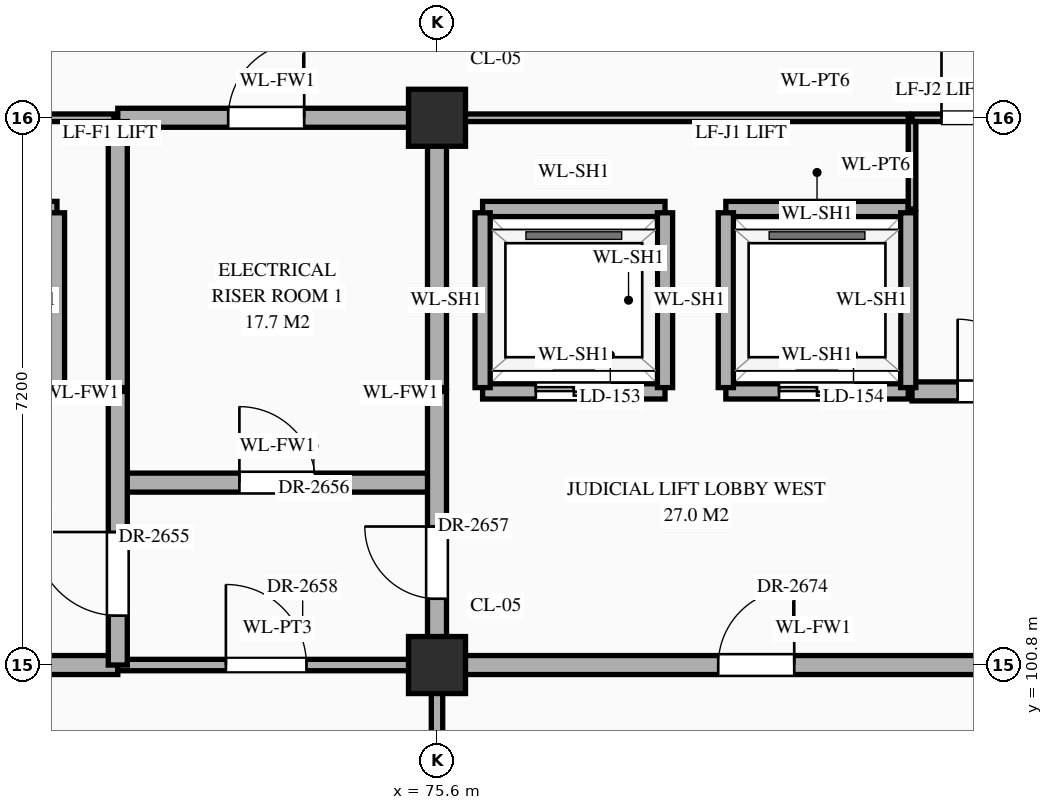
"""IFC4 building model, lengths in metres.
Left out: names, types, materials, properties, quantities, classifications, styles, units other than length and angle.
Written with IfcOpenShell. Run it as: python <this file> out.ifc"""

import sys

from ifc_helpers import new_model, si_unit, direction, frame, frame_2d, origin, origin_2d, place, context, subcontext, project, spatial, rectangle, extrude, element, fill, save


model = new_model("IFC4")
c1 = context("Model", 3, precision=1e-05, world=origin(), true_north=direction((0.0, 1.0)))
c2 = subcontext(c1, "Body", "Model", "MODEL_VIEW")
j1 = project(units=[si_unit("LENGTHUNIT", "METRE"), si_unit("PLANEANGLEUNIT", "RADIAN")], contexts=[c1])
p1 = place(None, origin())
s1 = spatial("IfcSite", under=j1, at=p1, CompositionType="ELEMENT")
p2 = place(p1, origin())
s2 = spatial("IfcBuilding", under=s1, at=p2, CompositionType="ELEMENT")
p3 = place(p2, frame((0.0, 0.0, 39.3)))
s3 = spatial("IfcBuildingStorey", under=s2, at=p3, CompositionType="ELEMENT", Elevation=39.3)
for number, where, z_axis, x_axis in (
    (1, (75.6, 100.8, 0.0), (0.0, 0.0, 1.0), (1.0, 0.0, 0.0)),
    (2, (75.6, 108.0, 0.0), (0.0, 0.0, 1.0), (1.0, 0.0, 0.0)),
):
    element("IfcColumn", number, at=place(p3, frame(where, z_axis=z_axis, x_axis=x_axis)), inside=s3, PredefinedType="COLUMN", context=c2, shape_type="SweptSolid", body=[
        extrude(rectangle(XDim=0.75, YDim=0.75, at=origin_2d()), origin(), (0.0, 0.0, 1.0), 4.2),
    ])
p4 = place(p3, frame((58.8, 100.8, 0.0), z_axis=(0.0, 0.0, 1.0), x_axis=(1.0, 0.0, 0.0)))
e3 = element("IfcWall", 3, at=p4, inside=s3, PredefinedType="STANDARD", context=c2, shape_type="SweptSolid", body=[
    extrude(rectangle(XDim=12.6, YDim=0.25, at=frame_2d((6.3, 0.0))), origin(), (0.0, 0.0, 1.0), 3.1),
])
p5 = place(p4, frame((3.7, 0.0, 0.0)))
e4 = element("IfcOpeningElement", 4, at=p5, cuts=e3, PredefinedType="OPENING", context=c2, shape_type="SweptSolid", body=[
    extrude(rectangle(XDim=1.0, YDim=2.2, at=frame_2d((0.5, 1.1))), frame((0.0, 0.137, 0.0), z_axis=(0.0, -1.0, 0.0), x_axis=(1.0, 0.0, 0.0)), (0.0, 0.0, 1.0), 0.274),
])
p6 = place(p3, frame((71.4, 100.8, 0.0), z_axis=(0.0, 0.0, 1.0), x_axis=(1.0, 0.0, 0.0)))
e5 = element("IfcWall", 5, at=p6, inside=s3, PredefinedType="STANDARD", context=c2, shape_type="SweptSolid", body=[
    extrude(rectangle(XDim=4.2, YDim=0.15, at=frame_2d((2.1, 0.0))), origin(), (0.0, 0.0, 1.0), 3.1),
])
p7 = place(p6, frame((1.423, 0.0, 0.0)))
e6 = element("IfcOpeningElement", 6, at=p7, cuts=e5, PredefinedType="OPENING", context=c2, shape_type="SweptSolid", body=[
    extrude(rectangle(XDim=1.06, YDim=2.4, at=frame_2d((0.53, 1.2))), frame((0.0, 0.087, 0.0), z_axis=(0.0, -1.0, 0.0), x_axis=(1.0, 0.0, 0.0)), (0.0, 0.0, 1.0), 0.174),
])
p8 = place(p3, frame((75.6, 100.8, 0.0), z_axis=(0.0, 0.0, 1.0), x_axis=(1.0, 0.0, 0.0)))
e7 = element("IfcWall", 7, at=p8, inside=s3, PredefinedType="STANDARD", context=c2, shape_type="SweptSolid", body=[
    extrude(rectangle(XDim=16.8, YDim=0.25, at=frame_2d((8.4, 0.0))), origin(), (0.0, 0.0, 1.0), 3.1),
])
p9 = place(p8, frame((3.7, 0.0, 0.0)))
e8 = element("IfcOpeningElement", 8, at=p9, cuts=e7, PredefinedType="OPENING", context=c2, shape_type="SweptSolid", body=[
    extrude(rectangle(XDim=1.0, YDim=2.2, at=frame_2d((0.5, 1.1))), frame((0.0, 0.137, 0.0), z_axis=(0.0, -1.0, 0.0), x_axis=(1.0, 0.0, 0.0)), (0.0, 0.0, 1.0), 0.274),
])
p10 = place(p8, frame((9.698, 0.0, 0.0)))
e9 = element("IfcOpeningElement", 9, at=p10, cuts=e7, PredefinedType="OPENING", context=c2, shape_type="SweptSolid", body=[
    extrude(rectangle(XDim=1.1, YDim=2.2, at=frame_2d((0.55, 1.1))), frame((0.0, 0.137, 0.0), z_axis=(0.0, -1.0, 0.0), x_axis=(1.0, 0.0, 0.0)), (0.0, 0.0, 1.0), 0.274),
])
p11 = place(p8, frame((12.5, 0.0, 0.0)))
e10 = element("IfcOpeningElement", 10, at=p11, cuts=e7, PredefinedType="OPENING", context=c2, shape_type="SweptSolid", body=[
    extrude(rectangle(XDim=1.0, YDim=2.2, at=frame_2d((0.5, 1.1))), frame((0.0, 0.137, 0.0), z_axis=(0.0, -1.0, 0.0), x_axis=(1.0, 0.0, 0.0)), (0.0, 0.0, 1.0), 0.274),
])
p12 = place(p8, frame((14.877, 0.0, 0.0)))
e11 = element("IfcOpeningElement", 11, at=p12, cuts=e7, PredefinedType="OPENING", context=c2, shape_type="SweptSolid", body=[
    extrude(rectangle(XDim=0.95, YDim=2.15, at=frame_2d((0.475, 1.075))), frame((0.0, 0.137, 0.0), z_axis=(0.0, -1.0, 0.0), x_axis=(1.0, 0.0, 0.0)), (0.0, 0.0, 1.0), 0.274),
])
p13 = place(p3, frame((71.4, 103.2, 0.0), z_axis=(0.0, 0.0, 1.0), x_axis=(1.0, 0.0, 0.0)))
e12 = element("IfcWall", 12, at=p13, inside=s3, PredefinedType="STANDARD", context=c2, shape_type="SweptSolid", body=[
    extrude(rectangle(XDim=4.2, YDim=0.25, at=frame_2d((2.1, 0.0))), origin(), (0.0, 0.0, 1.0), 3.95),
])
p14 = place(p13, frame((1.6, 0.0, 0.0)))
e13 = element("IfcOpeningElement", 13, at=p14, cuts=e12, PredefinedType="OPENING", context=c2, shape_type="SweptSolid", body=[
    extrude(rectangle(XDim=1.0, YDim=2.2, at=frame_2d((0.5, 1.1))), frame((0.0, 0.137, 0.0), z_axis=(0.0, -1.0, 0.0), x_axis=(1.0, 0.0, 0.0)), (0.0, 0.0, 1.0), 0.274),
])
p15 = place(p3, frame((67.6, 104.4, 0.0), z_axis=(0.0, 0.0, 1.0), x_axis=(1.0, 0.0, 0.0)))
e14 = element("IfcWall", 14, at=p15, inside=s3, PredefinedType="STANDARD", context=c2, shape_type="SweptSolid", body=[
    extrude(rectangle(XDim=3.0, YDim=0.2, at=frame_2d((1.5, 0.0))), origin(), (0.0, 0.0, 1.0), 3.95),
])
p16 = place(p15, frame((0.9, 0.0, 0.0)))
e15 = element("IfcOpeningElement", 15, at=p16, cuts=e14, PredefinedType="OPENING", context=c2, shape_type="SweptSolid", body=[
    extrude(rectangle(XDim=1.2, YDim=2.15, at=frame_2d((0.6, 1.075))), frame((0.0, 0.112, 0.0), z_axis=(0.0, -1.0, 0.0), x_axis=(1.0, 0.0, 0.0)), (0.0, 0.0, 1.0), 0.224),
])
p17 = place(p3, frame((76.2, 104.4, 0.0), z_axis=(0.0, 0.0, 1.0), x_axis=(1.0, 0.0, 0.0)))
e16 = element("IfcWall", 16, at=p17, inside=s3, PredefinedType="STANDARD", context=c2, shape_type="SweptSolid", body=[
    extrude(rectangle(XDim=2.4, YDim=0.2, at=frame_2d((1.2, 0.0))), origin(), (0.0, 0.0, 1.0), 3.95),
])
p18 = place(p17, frame((0.7, 0.0, 0.0)))
e17 = element("IfcOpeningElement", 17, at=p18, cuts=e16, PredefinedType="OPENING", context=c2, shape_type="SweptSolid", body=[
    extrude(rectangle(XDim=1.0, YDim=2.15, at=frame_2d((0.5, 1.075))), frame((0.0, 0.112, 0.0), z_axis=(0.0, -1.0, 0.0), x_axis=(1.0, 0.0, 0.0)), (0.0, 0.0, 1.0), 0.224),
])
p19 = place(p3, frame((79.4, 104.4, 0.0), z_axis=(0.0, 0.0, 1.0), x_axis=(1.0, 0.0, 0.0)))
e18 = element("IfcWall", 18, at=p19, inside=s3, PredefinedType="STANDARD", context=c2, shape_type="SweptSolid", body=[
    extrude(rectangle(XDim=2.4, YDim=0.2, at=frame_2d((1.2, 0.0))), origin(), (0.0, 0.0, 1.0), 3.95),
])
p20 = place(p19, frame((0.7, 0.0, 0.0)))
e19 = element("IfcOpeningElement", 19, at=p20, cuts=e18, PredefinedType="OPENING", context=c2, shape_type="SweptSolid", body=[
    extrude(rectangle(XDim=1.0, YDim=2.15, at=frame_2d((0.5, 1.075))), frame((0.0, 0.112, 0.0), z_axis=(0.0, -1.0, 0.0), x_axis=(1.0, 0.0, 0.0)), (0.0, 0.0, 1.0), 0.224),
])
p21 = place(p3, frame((81.85, 104.4, 0.0), z_axis=(0.0, 0.0, 1.0), x_axis=(1.0, 0.0, 0.0)))
e20 = element("IfcWall", 20, at=p21, inside=s3, PredefinedType="STANDARD", context=c2, shape_type="SweptSolid", body=[
    extrude(rectangle(XDim=4.3, YDim=0.25, at=frame_2d((2.15, 0.0))), origin(), (0.0, 0.0, 1.0), 3.95),
])
p22 = place(p21, frame((0.6, 0.0, 0.0)))
e21 = element("IfcOpeningElement", 21, at=p22, cuts=e20, PredefinedType="OPENING", context=c2, shape_type="SweptSolid", body=[
    extrude(rectangle(XDim=0.95, YDim=2.15, at=frame_2d((0.475, 1.075))), frame((0.0, 0.137, 0.0), z_axis=(0.0, -1.0, 0.0), x_axis=(1.0, 0.0, 0.0)), (0.0, 0.0, 1.0), 0.274),
])
p23 = place(p21, frame((2.675, 0.0, 0.0)))
e22 = element("IfcOpeningElement", 22, at=p23, cuts=e20, PredefinedType="OPENING", context=c2, shape_type="SweptSolid", body=[
    extrude(rectangle(XDim=1.1, YDim=2.2, at=frame_2d((0.55, 1.1))), frame((0.0, 0.137, 0.0), z_axis=(0.0, -1.0, 0.0), x_axis=(1.0, 0.0, 0.0)), (0.0, 0.0, 1.0), 0.274),
])
p24 = place(p3, frame((67.6, 106.8, 0.0), z_axis=(0.0, 0.0, 1.0), x_axis=(1.0, 0.0, 0.0)))
e23 = element("IfcWall", 23, at=p24, inside=s3, PredefinedType="STANDARD", context=c2, shape_type="SweptSolid", body=[
    extrude(rectangle(XDim=3.0, YDim=0.2, at=frame_2d((1.5, 0.0))), origin(), (0.0, 0.0, 1.0), 3.95),
])
for number, where, z_axis, x_axis in (
    (24, (76.2, 106.8, 0.0), (0.0, 0.0, 1.0), (1.0, 0.0, 0.0)),
    (25, (79.4, 106.8, 0.0), (0.0, 0.0, 1.0), (1.0, 0.0, 0.0)),
):
    element("IfcWall", number, at=place(p3, frame(where, z_axis=z_axis, x_axis=x_axis)), inside=s3, PredefinedType="STANDARD", context=c2, shape_type="SweptSolid", body=[
        extrude(rectangle(XDim=2.4, YDim=0.2, at=frame_2d((1.2, 0.0))), origin(), (0.0, 0.0, 1.0), 3.95),
    ])
p25 = place(p3, frame((67.25, 108.0, 0.0), z_axis=(0.0, 0.0, 1.0), x_axis=(1.0, 0.0, 0.0)))
e26 = element("IfcWall", 26, at=p25, inside=s3, PredefinedType="STANDARD", context=c2, shape_type="SweptSolid", body=[
    extrude(rectangle(XDim=4.1, YDim=0.1, at=frame_2d((2.05, 0.0))), origin(), (0.0, 0.0, 1.0), 3.1),
])
p26 = place(p3, frame((71.4, 108.0, 0.0), z_axis=(0.0, 0.0, 1.0), x_axis=(1.0, 0.0, 0.0)))
e27 = element("IfcWall", 27, at=p26, inside=s3, PredefinedType="STANDARD", context=c2, shape_type="SweptSolid", body=[
    extrude(rectangle(XDim=4.2, YDim=0.25, at=frame_2d((2.1, 0.0))), origin(), (0.0, 0.0, 1.0), 3.1),
])
p27 = place(p26, frame((1.452, 0.0, 0.0)))
e28 = element("IfcOpeningElement", 28, at=p27, cuts=e27, PredefinedType="OPENING", context=c2, shape_type="SweptSolid", body=[
    extrude(rectangle(XDim=1.0, YDim=2.2, at=frame_2d((0.5, 1.1))), frame((0.0, 0.137, 0.0), z_axis=(0.0, -1.0, 0.0), x_axis=(1.0, 0.0, 0.0)), (0.0, 0.0, 1.0), 0.274),
])
p28 = place(p3, frame((75.65, 108.0, 0.0), z_axis=(0.0, 0.0, 1.0), x_axis=(1.0, 0.0, 0.0)))
e29 = element("IfcWall", 29, at=p28, inside=s3, PredefinedType="STANDARD", context=c2, shape_type="SweptSolid", body=[
    extrude(rectangle(XDim=6.15, YDim=0.1, at=frame_2d((3.075, 0.0))), origin(), (0.0, 0.0, 1.0), 3.1),
])
p29 = place(p3, frame((81.85, 108.0, 0.0), z_axis=(0.0, 0.0, 1.0), x_axis=(1.0, 0.0, 0.0)))
e30 = element("IfcWall", 30, at=p29, inside=s3, PredefinedType="STANDARD", context=c2, shape_type="SweptSolid", body=[
    extrude(rectangle(XDim=4.3, YDim=0.1, at=frame_2d((2.15, 0.0))), origin(), (0.0, 0.0, 1.0), 3.1),
])
p30 = place(p29, frame((0.387, 0.0, 0.0)))
e31 = element("IfcOpeningElement", 31, at=p30, cuts=e30, PredefinedType="OPENING", context=c2, shape_type="SweptSolid", body=[
    extrude(rectangle(XDim=1.08, YDim=2.25, at=frame_2d((0.54, 1.125))), frame((0.0, 0.062, 0.0), z_axis=(0.0, -1.0, 0.0), x_axis=(1.0, 0.0, 0.0)), (0.0, 0.0, 1.0), 0.124),
])
p31 = place(p29, frame((2.812, 0.0, 0.0)))
e32 = element("IfcOpeningElement", 32, at=p31, cuts=e30, PredefinedType="OPENING", context=c2, shape_type="SweptSolid", body=[
    extrude(rectangle(XDim=1.12, YDim=2.25, at=frame_2d((0.56, 1.125))), frame((0.0, 0.062, 0.0), z_axis=(0.0, -1.0, 0.0), x_axis=(1.0, 0.0, 0.0)), (0.0, 0.0, 1.0), 0.124),
])
p32 = place(p3, frame((70.6, 104.45, 0.0), z_axis=(0.0, 0.0, 1.0), x_axis=(0.0, 1.0, 0.0)))
e33 = element("IfcWall", 33, at=p32, inside=s3, PredefinedType="STANDARD", context=c2, shape_type="SweptSolid", body=[
    extrude(rectangle(XDim=2.3, YDim=0.2, at=frame_2d((1.15, 0.0))), origin(), (0.0, 0.0, 1.0), 3.95),
])
p33 = place(p3, frame((71.4, 100.8, 0.0), z_axis=(0.0, 0.0, 1.0), x_axis=(0.0, 1.0, 0.0)))
e34 = element("IfcWall", 34, at=p33, inside=s3, PredefinedType="STANDARD", context=c2, shape_type="SweptSolid", body=[
    extrude(rectangle(XDim=3.6, YDim=0.25, at=frame_2d((1.8, 0.0))), origin(), (0.0, 0.0, 1.0), 3.6),
])
p34 = place(p33, frame((0.65, 0.0, 0.0)))
e35 = element("IfcOpeningElement", 35, at=p34, cuts=e34, PredefinedType="OPENING", context=c2, shape_type="SweptSolid", body=[
    extrude(rectangle(XDim=1.1, YDim=2.2, at=frame_2d((0.55, 1.1))), frame((0.0, 0.137, 0.0), z_axis=(0.0, -1.0, 0.0), x_axis=(1.0, 0.0, 0.0)), (0.0, 0.0, 1.0), 0.274),
])
p35 = place(p3, frame((71.4, 104.45, 0.0), z_axis=(0.0, 0.0, 1.0), x_axis=(0.0, 1.0, 0.0)))
e36 = element("IfcWall", 36, at=p35, inside=s3, PredefinedType="STANDARD", context=c2, shape_type="SweptSolid", body=[
    extrude(rectangle(XDim=3.5, YDim=0.25, at=frame_2d((1.75, 0.0))), origin(), (0.0, 0.0, 1.0), 3.6),
])
p36 = place(p3, frame((75.6, 96.0, 0.0), z_axis=(0.0, 0.0, 1.0), x_axis=(0.0, 1.0, 0.0)))
e37 = element("IfcWall", 37, at=p36, inside=s3, PredefinedType="STANDARD", context=c2, shape_type="SweptSolid", body=[
    extrude(rectangle(XDim=4.8, YDim=0.15, at=frame_2d((2.4, 0.0))), origin(), (0.0, 0.0, 1.0), 3.2),
])
p37 = place(p3, frame((75.6, 100.8, 0.0), z_axis=(0.0, 0.0, 1.0), x_axis=(0.0, 1.0, 0.0)))
e38 = element("IfcWall", 38, at=p37, inside=s3, PredefinedType="STANDARD", context=c2, shape_type="SweptSolid", body=[
    extrude(rectangle(XDim=3.6, YDim=0.25, at=frame_2d((1.8, 0.0))), origin(), (0.0, 0.0, 1.0), 3.2),
])
p38 = place(p37, frame((0.873, 0.0, 0.0)))
e39 = element("IfcOpeningElement", 39, at=p38, cuts=e38, PredefinedType="OPENING", context=c2, shape_type="SweptSolid", body=[
    extrude(rectangle(XDim=0.95, YDim=2.15, at=frame_2d((0.475, 1.075))), frame((0.0, 0.137, 0.0), z_axis=(0.0, -1.0, 0.0), x_axis=(1.0, 0.0, 0.0)), (0.0, 0.0, 1.0), 0.274),
])
p39 = place(p3, frame((75.6, 104.45, 0.0), z_axis=(0.0, 0.0, 1.0), x_axis=(0.0, 1.0, 0.0)))
e40 = element("IfcWall", 40, at=p39, inside=s3, PredefinedType="STANDARD", context=c2, shape_type="SweptSolid", body=[
    extrude(rectangle(XDim=3.5, YDim=0.25, at=frame_2d((1.75, 0.0))), origin(), (0.0, 0.0, 1.0), 3.2),
])
for number, where, z_axis, x_axis in (
    (41, (76.2, 104.45, 0.0), (0.0, 0.0, 1.0), (0.0, 1.0, 0.0)),
    (42, (78.6, 104.45, 0.0), (0.0, 0.0, 1.0), (0.0, 1.0, 0.0)),
    (43, (79.4, 104.45, 0.0), (0.0, 0.0, 1.0), (0.0, 1.0, 0.0)),
    (44, (81.8, 104.45, 0.0), (0.0, 0.0, 1.0), (0.0, 1.0, 0.0)),
):
    element("IfcWall", number, at=place(p3, frame(where, z_axis=z_axis, x_axis=x_axis)), inside=s3, PredefinedType="STANDARD", context=c2, shape_type="SweptSolid", body=[
        extrude(rectangle(XDim=2.3, YDim=0.2, at=frame_2d((1.15, 0.0))), origin(), (0.0, 0.0, 1.0), 3.95),
    ])
p40 = place(p3, frame((81.85, 106.8, 0.0), z_axis=(0.0, 0.0, 1.0), x_axis=(0.0, 1.0, 0.0)))
e45 = element("IfcWall", 45, at=p40, inside=s3, PredefinedType="STANDARD", context=c2, shape_type="SweptSolid", body=[
    extrude(rectangle(XDim=1.15, YDim=0.1, at=frame_2d((0.575, 0.0))), origin(), (0.0, 0.0, 1.0), 3.95),
])
p41 = place(p18, origin())
e46 = element("IfcDoor", 46, at=p41, inside=s3, OperationType="DOUBLE_DOOR_SLIDING", PredefinedType="DOOR", context=c2, shape_type="SweptSolid", body=[
    extrude(rectangle(XDim=1.0, YDim=2.15, at=frame_2d((0.5, 1.075))), frame((0.0, 0.025, 0.0), z_axis=(0.0, -1.0, 0.0), x_axis=(1.0, 0.0, 0.0)), (0.0, 0.0, 1.0), 0.05),
])
fill(e17, e46)
p42 = place(p20, origin())
e47 = element("IfcDoor", 47, at=p42, inside=s3, OperationType="DOUBLE_DOOR_SLIDING", PredefinedType="DOOR", context=c2, shape_type="SweptSolid", body=[
    extrude(rectangle(XDim=1.0, YDim=2.15, at=frame_2d((0.5, 1.075))), frame((0.0, 0.025, 0.0), z_axis=(0.0, -1.0, 0.0), x_axis=(1.0, 0.0, 0.0)), (0.0, 0.0, 1.0), 0.05),
])
fill(e19, e47)
p43 = place(p34, origin())
e48 = element("IfcDoor", 48, at=p43, inside=s3, OperationType="SINGLE_SWING_RIGHT", PredefinedType="DOOR", context=c2, shape_type="SweptSolid", body=[
    extrude(rectangle(XDim=1.1, YDim=2.2, at=frame_2d((0.55, 1.1))), frame((0.0, 0.025, 0.0), z_axis=(0.0, -1.0, 0.0), x_axis=(1.0, 0.0, 0.0)), (0.0, 0.0, 1.0), 0.05),
])
fill(e35, e48)
p44 = place(p14, origin())
e49 = element("IfcDoor", 49, at=p44, inside=s3, OperationType="SINGLE_SWING_LEFT", PredefinedType="DOOR", context=c2, shape_type="SweptSolid", body=[
    extrude(rectangle(XDim=1.0, YDim=2.2, at=frame_2d((0.5, 1.1))), frame((0.0, 0.025, 0.0), z_axis=(0.0, -1.0, 0.0), x_axis=(1.0, 0.0, 0.0)), (0.0, 0.0, 1.0), 0.05),
])
fill(e13, e49)
p45 = place(p38, origin())
e50 = element("IfcDoor", 50, at=p45, inside=s3, OperationType="SINGLE_SWING_RIGHT", PredefinedType="DOOR", context=c2, shape_type="SweptSolid", body=[
    extrude(rectangle(XDim=0.95, YDim=2.15, at=frame_2d((0.475, 1.075))), frame((0.0, 0.025, 0.0), z_axis=(0.0, -1.0, 0.0), x_axis=(1.0, 0.0, 0.0)), (0.0, 0.0, 1.0), 0.05),
])
fill(e39, e50)
p46 = place(p7, origin())
e51 = element("IfcDoor", 51, at=p46, inside=s3, OperationType="SINGLE_SWING_LEFT", PredefinedType="DOOR", context=c2, shape_type="SweptSolid", body=[
    extrude(rectangle(XDim=1.06, YDim=2.4, at=frame_2d((0.53, 1.2))), frame((0.0, 0.025, 0.0), z_axis=(0.0, -1.0, 0.0), x_axis=(1.0, 0.0, 0.0)), (0.0, 0.0, 1.0), 0.05),
])
fill(e6, e51)
p47 = place(p27, origin())
e52 = element("IfcDoor", 52, at=p47, inside=s3, OperationType="SINGLE_SWING_RIGHT", PredefinedType="DOOR", context=c2, shape_type="SweptSolid", body=[
    extrude(rectangle(XDim=1.0, YDim=2.2, at=frame_2d((0.5, 1.1))), frame((0.0, 0.025, 0.0), z_axis=(0.0, -1.0, 0.0), x_axis=(1.0, 0.0, 0.0)), (0.0, 0.0, 1.0), 0.05),
])
fill(e28, e52)
p48 = place(p9, origin())
e53 = element("IfcDoor", 53, at=p48, inside=s3, OperationType="SINGLE_SWING_RIGHT", PredefinedType="DOOR", context=c2, shape_type="SweptSolid", body=[
    extrude(rectangle(XDim=1.0, YDim=2.2, at=frame_2d((0.5, 1.1))), frame((0.0, 0.025, 0.0), z_axis=(0.0, -1.0, 0.0), x_axis=(1.0, 0.0, 0.0)), (0.0, 0.0, 1.0), 0.05),
])
fill(e8, e53)
p49 = place(p22, origin())
e54 = element("IfcDoor", 54, at=p49, inside=s3, OperationType="SINGLE_SWING_LEFT", PredefinedType="DOOR", context=c2, shape_type="SweptSolid", body=[
    extrude(rectangle(XDim=0.95, YDim=2.15, at=frame_2d((0.475, 1.075))), frame((0.0, 0.025, 0.0), z_axis=(0.0, -1.0, 0.0), x_axis=(1.0, 0.0, 0.0)), (0.0, 0.0, 1.0), 0.05),
])
fill(e21, e54)
p50 = place(p30, origin())
e55 = element("IfcDoor", 55, at=p50, inside=s3, OperationType="SINGLE_SWING_LEFT", PredefinedType="DOOR", context=c2, shape_type="SweptSolid", body=[
    extrude(rectangle(XDim=1.08, YDim=2.25, at=frame_2d((0.54, 1.125))), frame((0.0, 0.025, 0.0), z_axis=(0.0, -1.0, 0.0), x_axis=(1.0, 0.0, 0.0)), (0.0, 0.0, 1.0), 0.05),
])
fill(e31, e55)
save(model, sys.argv[1])
